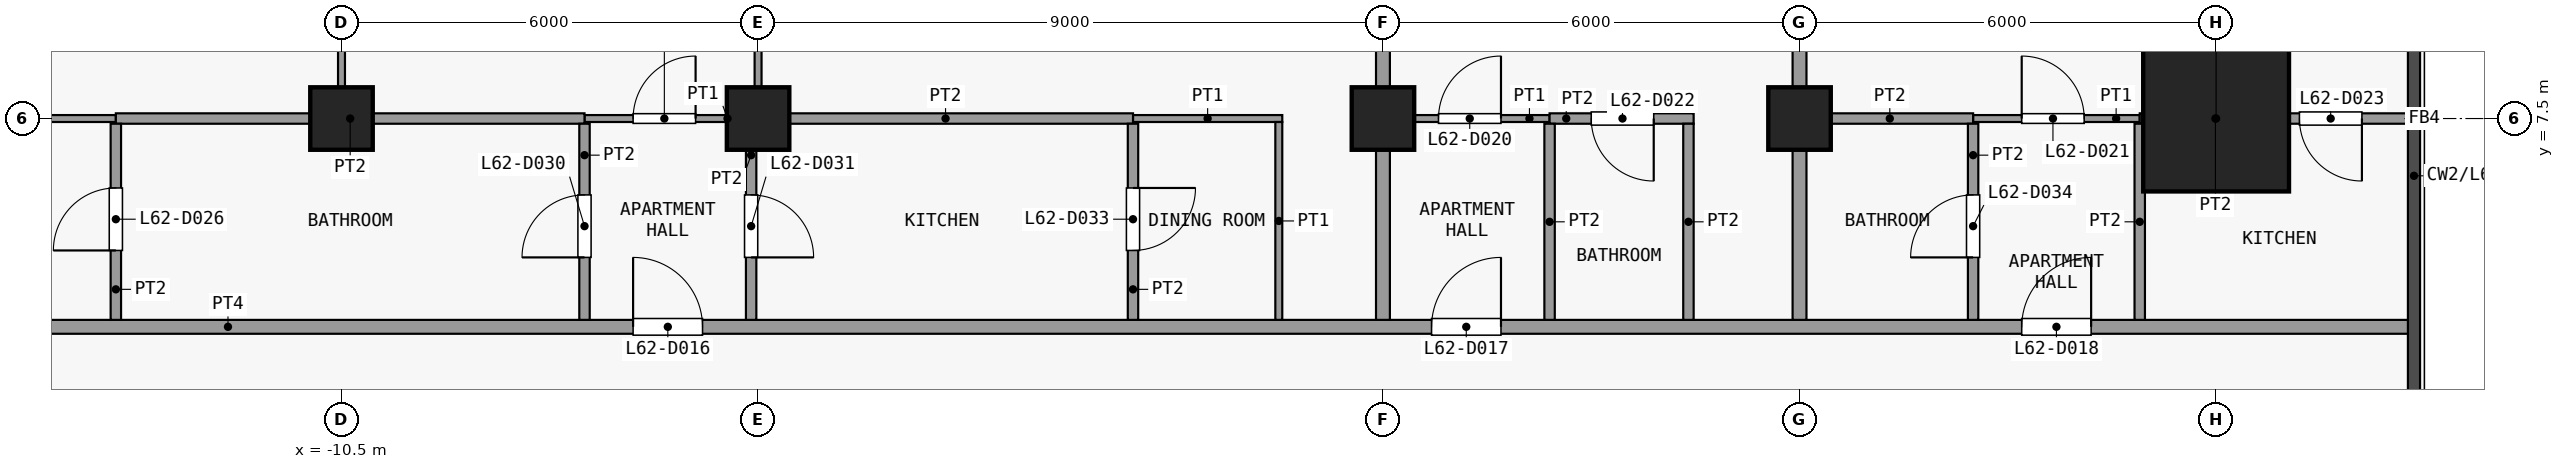
"""IFC4 building model, lengths in metres.
Left out: names, types, materials, properties, quantities, classifications, styles, units other than length and angle.
Written with IfcOpenShell. Run it as: python <this file> out.ifc"""

import sys

from ifc_helpers import new_model, si_unit, direction, frame, frame_2d, origin, origin_2d, place, context, subcontext, project, spatial, rectangle, extrude, element, fill, save


model = new_model("IFC4")
c1 = context("Model", 3, precision=1e-05, world=origin(), true_north=direction((0.0, 1.0)))
c2 = subcontext(c1, "Body", "Model", "MODEL_VIEW")
j1 = project(units=[si_unit("LENGTHUNIT", "METRE"), si_unit("PLANEANGLEUNIT", "RADIAN")], contexts=[c1])
p1 = place(None, origin())
s1 = spatial("IfcSite", under=j1, at=p1, CompositionType="ELEMENT")
p2 = place(p1, origin())
s2 = spatial("IfcBuilding", under=s1, at=p2, CompositionType="ELEMENT")
p3 = place(p2, frame((0.0, 0.0, 244.7)))
s3 = spatial("IfcBuildingStorey", under=s2, at=p3, CompositionType="ELEMENT", Elevation=244.7)
for number, where, z_axis, x_axis in (
    (1, (-10.5, 7.5, 0.0), (0.0, 0.0, 1.0), (1.0, 0.0, 0.0)),
    (2, (-4.5, 7.5, 0.0), (0.0, 0.0, 1.0), (1.0, 0.0, 0.0)),
    (3, (4.5, 7.5, 0.0), (0.0, 0.0, 1.0), (1.0, 0.0, 0.0)),
    (4, (10.5, 7.5, 0.0), (0.0, 0.0, 1.0), (1.0, 0.0, 0.0)),
):
    element("IfcColumn", number, at=place(p3, frame(where, z_axis=z_axis, x_axis=x_axis)), inside=s3, PredefinedType="COLUMN", context=c2, shape_type="SweptSolid", body=[
        extrude(rectangle(XDim=0.9, YDim=0.9, at=origin_2d()), origin(), (0.0, 0.0, 1.0), 3.6),
    ])
p4 = place(p3, frame((16.5, 7.5, 0.0), z_axis=(0.0, 0.0, 1.0), x_axis=(1.0, 0.0, 0.0)))
e5 = element("IfcColumn", 5, at=p4, inside=s3, PredefinedType="COLUMN", context=c2, shape_type="SweptSolid", body=[
    extrude(rectangle(XDim=2.1, YDim=2.1, at=origin_2d()), origin(), (0.0, 0.0, 1.0), 3.6),
])
p5 = place(p3, frame((-17.85, 4.5, 0.0), z_axis=(0.0, 0.0, 1.0), x_axis=(1.0, 0.0, 0.0)))
e6 = element("IfcWall", 6, at=p5, inside=s3, PredefinedType="PARTITIONING", context=c2, shape_type="SweptSolid", body=[
    extrude(rectangle(XDim=37.2, YDim=0.2, at=frame_2d((18.6, 0.0))), origin(), (0.0, 0.0, 1.0), 3.15),
])
p6 = place(p5, frame((11.55, 0.0, 0.0)))
e7 = element("IfcOpeningElement", 7, at=p6, cuts=e6, PredefinedType="OPENING", context=c2, shape_type="SweptSolid", body=[
    extrude(rectangle(XDim=1.0, YDim=2.1, at=frame_2d((0.5, 1.05))), frame((0.0, 0.11, 0.0), z_axis=(0.0, -1.0, 0.0), x_axis=(1.0, 0.0, 0.0)), (0.0, 0.0, 1.0), 0.22),
])
p7 = place(p5, frame((23.05, 0.0, 0.0)))
e8 = element("IfcOpeningElement", 8, at=p7, cuts=e6, PredefinedType="OPENING", context=c2, shape_type="SweptSolid", body=[
    extrude(rectangle(XDim=1.0, YDim=2.1, at=frame_2d((0.5, 1.05))), frame((0.0, 0.11, 0.0), z_axis=(0.0, -1.0, 0.0), x_axis=(1.0, 0.0, 0.0)), (0.0, 0.0, 1.0), 0.22),
])
p8 = place(p5, frame((31.55, 0.0, 0.0)))
e9 = element("IfcOpeningElement", 9, at=p8, cuts=e6, PredefinedType="OPENING", context=c2, shape_type="SweptSolid", body=[
    extrude(rectangle(XDim=1.0, YDim=2.1, at=frame_2d((0.5, 1.05))), frame((0.0, 0.11, 0.0), z_axis=(0.0, -1.0, 0.0), x_axis=(1.0, 0.0, 0.0)), (0.0, 0.0, 1.0), 0.22),
])
p9 = place(p3, frame((-17.85, 7.5, 0.0), z_axis=(0.0, 0.0, 1.0), x_axis=(1.0, 0.0, 0.0)))
e10 = element("IfcWall", 10, at=p9, inside=s3, PredefinedType="PARTITIONING", context=c2, shape_type="SweptSolid", body=[
    extrude(rectangle(XDim=4.1, YDim=0.1, at=frame_2d((2.05, 0.0))), origin(), (0.0, 0.0, 1.0), 3.15),
])
p10 = place(p3, frame((-7.0, 7.5, 0.0), z_axis=(0.0, 0.0, 1.0), x_axis=(1.0, 0.0, 0.0)))
e11 = element("IfcWall", 11, at=p10, inside=s3, PredefinedType="PARTITIONING", context=c2, shape_type="SweptSolid", body=[
    extrude(rectangle(XDim=2.4, YDim=0.1, at=frame_2d((1.2, 0.0))), origin(), (0.0, 0.0, 1.0), 3.15),
])
p11 = place(p10, frame((0.7, 0.0, 0.0)))
e12 = element("IfcOpeningElement", 12, at=p11, cuts=e11, PredefinedType="OPENING", context=c2, shape_type="SweptSolid", body=[
    extrude(rectangle(XDim=0.9, YDim=2.1, at=frame_2d((0.45, 1.05))), frame((0.0, 0.06, 0.0), z_axis=(0.0, -1.0, 0.0), x_axis=(1.0, 0.0, 0.0)), (0.0, 0.0, 1.0), 0.12),
])
p12 = place(p3, frame((0.9, 7.5, 0.0), z_axis=(0.0, 0.0, 1.0), x_axis=(1.0, 0.0, 0.0)))
e13 = element("IfcWall", 13, at=p12, inside=s3, PredefinedType="PARTITIONING", context=c2, shape_type="SweptSolid", body=[
    extrude(rectangle(XDim=2.15, YDim=0.1, at=frame_2d((1.075, 0.0))), origin(), (0.0, 0.0, 1.0), 3.15),
])
p13 = place(p3, frame((4.6, 7.5, 0.0), z_axis=(0.0, 0.0, 1.0), x_axis=(1.0, 0.0, 0.0)))
e14 = element("IfcWall", 14, at=p13, inside=s3, PredefinedType="PARTITIONING", context=c2, shape_type="SweptSolid", body=[
    extrude(rectangle(XDim=2.3, YDim=0.1, at=frame_2d((1.15, 0.0))), origin(), (0.0, 0.0, 1.0), 3.15),
])
p14 = place(p13, frame((0.7, 0.0, 0.0)))
e15 = element("IfcOpeningElement", 15, at=p14, cuts=e14, PredefinedType="OPENING", context=c2, shape_type="SweptSolid", body=[
    extrude(rectangle(XDim=0.9, YDim=2.1, at=frame_2d((0.45, 1.05))), frame((0.0, 0.06, 0.0), z_axis=(0.0, -1.0, 0.0), x_axis=(1.0, 0.0, 0.0)), (0.0, 0.0, 1.0), 0.12),
])
p15 = place(p3, frame((13.0, 7.5, 0.0), z_axis=(0.0, 0.0, 1.0), x_axis=(1.0, 0.0, 0.0)))
e16 = element("IfcWall", 16, at=p15, inside=s3, PredefinedType="PARTITIONING", context=c2, shape_type="SweptSolid", body=[
    extrude(rectangle(XDim=2.4, YDim=0.1, at=frame_2d((1.2, 0.0))), origin(), (0.0, 0.0, 1.0), 3.15),
])
p16 = place(p15, frame((0.7, 0.0, 0.0)))
e17 = element("IfcOpeningElement", 17, at=p16, cuts=e16, PredefinedType="OPENING", context=c2, shape_type="SweptSolid", body=[
    extrude(rectangle(XDim=0.9, YDim=2.1, at=frame_2d((0.45, 1.05))), frame((0.0, 0.06, 0.0), z_axis=(0.0, -1.0, 0.0), x_axis=(1.0, 0.0, 0.0)), (0.0, 0.0, 1.0), 0.12),
])
p17 = place(p3, frame((-13.75, 7.5, 0.0), z_axis=(0.0, 0.0, 1.0), x_axis=(1.0, 0.0, 0.0)))
e18 = element("IfcWall", 18, at=p17, inside=s3, PredefinedType="PARTITIONING", context=c2, shape_type="SweptSolid", body=[
    extrude(rectangle(XDim=6.75, YDim=0.15, at=frame_2d((3.375, 0.0))), origin(), (0.0, 0.0, 1.0), 3.15),
])
p18 = place(p3, frame((-4.5, 7.5, 0.0), z_axis=(0.0, 0.0, 1.0), x_axis=(1.0, 0.0, 0.0)))
e19 = element("IfcWall", 19, at=p18, inside=s3, PredefinedType="PARTITIONING", context=c2, shape_type="SweptSolid", body=[
    extrude(rectangle(XDim=5.4, YDim=0.15, at=frame_2d((2.7, 0.0))), origin(), (0.0, 0.0, 1.0), 3.15),
])
p19 = place(p3, frame((6.9, 7.5, 0.0), z_axis=(0.0, 0.0, 1.0), x_axis=(1.0, 0.0, 0.0)))
e20 = element("IfcWall", 20, at=p19, inside=s3, PredefinedType="PARTITIONING", context=c2, shape_type="SweptSolid", body=[
    extrude(rectangle(XDim=2.075, YDim=0.15, at=frame_2d((1.038, 0.0))), origin(), (0.0, 0.0, 1.0), 3.15),
])
p20 = place(p19, frame((0.6, 0.0, 0.0)))
e21 = element("IfcOpeningElement", 21, at=p20, cuts=e20, PredefinedType="OPENING", context=c2, shape_type="SweptSolid", body=[
    extrude(rectangle(XDim=0.9, YDim=2.1, at=frame_2d((0.45, 1.05))), frame((0.0, 0.085, 0.0), z_axis=(0.0, -1.0, 0.0), x_axis=(1.0, 0.0, 0.0)), (0.0, 0.0, 1.0), 0.17),
])
p21 = place(p3, frame((10.6, 7.5, 0.0), z_axis=(0.0, 0.0, 1.0), x_axis=(1.0, 0.0, 0.0)))
e22 = element("IfcWall", 22, at=p21, inside=s3, PredefinedType="PARTITIONING", context=c2, shape_type="SweptSolid", body=[
    extrude(rectangle(XDim=2.4, YDim=0.15, at=frame_2d((1.2, 0.0))), origin(), (0.0, 0.0, 1.0), 3.15),
])
p22 = place(p3, frame((15.4, 7.5, 0.0), z_axis=(0.0, 0.0, 1.0), x_axis=(1.0, 0.0, 0.0)))
e23 = element("IfcWall", 23, at=p22, inside=s3, PredefinedType="PARTITIONING", context=c2, shape_type="SweptSolid", body=[
    extrude(rectangle(XDim=3.863, YDim=0.15, at=frame_2d((1.931, 0.0))), origin(), (0.0, 0.0, 1.0), 3.15),
])
p23 = place(p22, frame((2.3, 0.0, 0.0)))
e24 = element("IfcOpeningElement", 24, at=p23, cuts=e23, PredefinedType="OPENING", context=c2, shape_type="SweptSolid", body=[
    extrude(rectangle(XDim=0.9, YDim=2.1, at=frame_2d((0.45, 1.05))), frame((0.0, 0.085, 0.0), z_axis=(0.0, -1.0, 0.0), x_axis=(1.0, 0.0, 0.0)), (0.0, 0.0, 1.0), 0.17),
])
p24 = place(p3, frame((-13.75, 4.6, 0.0), z_axis=(0.0, 0.0, 1.0), x_axis=(0.0, 1.0, 0.0)))
e25 = element("IfcWall", 25, at=p24, inside=s3, PredefinedType="PARTITIONING", context=c2, shape_type="SweptSolid", body=[
    extrude(rectangle(XDim=2.825, YDim=0.15, at=frame_2d((1.413, 0.0))), origin(), (0.0, 0.0, 1.0), 3.15),
])
p25 = place(p24, frame((1.0, 0.0, 0.0)))
e26 = element("IfcOpeningElement", 26, at=p25, cuts=e25, PredefinedType="OPENING", context=c2, shape_type="SweptSolid", body=[
    extrude(rectangle(XDim=0.9, YDim=2.1, at=frame_2d((0.45, 1.05))), frame((0.0, 0.085, 0.0), z_axis=(0.0, -1.0, 0.0), x_axis=(1.0, 0.0, 0.0)), (0.0, 0.0, 1.0), 0.17),
])
p26 = place(p3, frame((-10.5, 7.575, 0.0), z_axis=(0.0, 0.0, 1.0), x_axis=(0.0, 1.0, 0.0)))
e27 = element("IfcWall", 27, at=p26, inside=s3, PredefinedType="PARTITIONING", context=c2, shape_type="SweptSolid", body=[
    extrude(rectangle(XDim=8.688, YDim=0.1, at=frame_2d((4.344, 0.0))), origin(), (0.0, 0.0, 1.0), 3.15),
])
p27 = place(p26, frame((6.425, 0.0, 0.0)))
e28 = element("IfcOpeningElement", 28, at=p27, cuts=e27, PredefinedType="OPENING", context=c2, shape_type="SweptSolid", body=[
    extrude(rectangle(XDim=0.9, YDim=2.1, at=frame_2d((0.45, 1.05))), frame((0.0, 0.06, 0.0), z_axis=(0.0, -1.0, 0.0), x_axis=(1.0, 0.0, 0.0)), (0.0, 0.0, 1.0), 0.12),
])
p28 = place(p3, frame((-7.0, 4.6, 0.0), z_axis=(0.0, 0.0, 1.0), x_axis=(0.0, 1.0, 0.0)))
e29 = element("IfcWall", 29, at=p28, inside=s3, PredefinedType="PARTITIONING", context=c2, shape_type="SweptSolid", body=[
    extrude(rectangle(XDim=2.825, YDim=0.15, at=frame_2d((1.413, 0.0))), origin(), (0.0, 0.0, 1.0), 3.15),
])
p29 = place(p28, frame((0.9, 0.0, 0.0)))
e30 = element("IfcOpeningElement", 30, at=p29, cuts=e29, PredefinedType="OPENING", context=c2, shape_type="SweptSolid", body=[
    extrude(rectangle(XDim=0.9, YDim=2.1, at=frame_2d((0.45, 1.05))), frame((0.0, 0.085, 0.0), z_axis=(0.0, -1.0, 0.0), x_axis=(1.0, 0.0, 0.0)), (0.0, 0.0, 1.0), 0.17),
])
p30 = place(p3, frame((-4.6, 4.6, 0.0), z_axis=(0.0, 0.0, 1.0), x_axis=(0.0, 1.0, 0.0)))
e31 = element("IfcWall", 31, at=p30, inside=s3, PredefinedType="PARTITIONING", context=c2, shape_type="SweptSolid", body=[
    extrude(rectangle(XDim=2.825, YDim=0.15, at=frame_2d((1.413, 0.0))), origin(), (0.0, 0.0, 1.0), 3.15),
])
p31 = place(p30, frame((0.9, 0.0, 0.0)))
e32 = element("IfcOpeningElement", 32, at=p31, cuts=e31, PredefinedType="OPENING", context=c2, shape_type="SweptSolid", body=[
    extrude(rectangle(XDim=0.9, YDim=2.1, at=frame_2d((0.45, 1.05))), frame((0.0, 0.085, 0.0), z_axis=(0.0, -1.0, 0.0), x_axis=(1.0, 0.0, 0.0)), (0.0, 0.0, 1.0), 0.17),
])
p32 = place(p3, frame((-4.5, 7.575, 0.0), z_axis=(0.0, 0.0, 1.0), x_axis=(0.0, 1.0, 0.0)))
e33 = element("IfcWall", 33, at=p32, inside=s3, PredefinedType="PARTITIONING", context=c2, shape_type="SweptSolid", body=[
    extrude(rectangle(XDim=8.688, YDim=0.1, at=frame_2d((4.344, 0.0))), origin(), (0.0, 0.0, 1.0), 3.15),
])
p33 = place(p32, frame((6.425, 0.0, 0.0)))
e34 = element("IfcOpeningElement", 34, at=p33, cuts=e33, PredefinedType="OPENING", context=c2, shape_type="SweptSolid", body=[
    extrude(rectangle(XDim=0.9, YDim=2.1, at=frame_2d((0.45, 1.05))), frame((0.0, 0.06, 0.0), z_axis=(0.0, -1.0, 0.0), x_axis=(1.0, 0.0, 0.0)), (0.0, 0.0, 1.0), 0.12),
])
p34 = place(p3, frame((0.9, 4.6, 0.0), z_axis=(0.0, 0.0, 1.0), x_axis=(0.0, 1.0, 0.0)))
e35 = element("IfcWall", 35, at=p34, inside=s3, PredefinedType="PARTITIONING", context=c2, shape_type="SweptSolid", body=[
    extrude(rectangle(XDim=2.825, YDim=0.15, at=frame_2d((1.413, 0.0))), origin(), (0.0, 0.0, 1.0), 3.15),
])
p35 = place(p34, frame((1.0, 0.0, 0.0)))
e36 = element("IfcOpeningElement", 36, at=p35, cuts=e35, PredefinedType="OPENING", context=c2, shape_type="SweptSolid", body=[
    extrude(rectangle(XDim=0.9, YDim=2.1, at=frame_2d((0.45, 1.05))), frame((0.0, 0.085, 0.0), z_axis=(0.0, -1.0, 0.0), x_axis=(1.0, 0.0, 0.0)), (0.0, 0.0, 1.0), 0.17),
])
p36 = place(p3, frame((3.0, 4.6, 0.0), z_axis=(0.0, 0.0, 1.0), x_axis=(0.0, 1.0, 0.0)))
e37 = element("IfcWall", 37, at=p36, inside=s3, PredefinedType="PARTITIONING", context=c2, shape_type="SweptSolid", body=[
    extrude(rectangle(XDim=2.85, YDim=0.1, at=frame_2d((1.425, 0.0))), origin(), (0.0, 0.0, 1.0), 3.15),
])
p37 = place(p3, frame((4.5, 4.6, 0.0), z_axis=(0.0, 0.0, 1.0), x_axis=(0.0, 1.0, 0.0)))
e38 = element("IfcWall", 38, at=p37, inside=s3, PredefinedType="PARTITIONING", context=c2, shape_type="SweptSolid", body=[
    extrude(rectangle(XDim=11.662, YDim=0.2, at=frame_2d((5.831, 0.0))), origin(), (0.0, 0.0, 1.0), 3.15),
])
for number, where, z_axis, x_axis in (
    (39, (6.9, 4.6, 0.0), (0.0, 0.0, 1.0), (0.0, 1.0, 0.0)),
    (40, (8.9, 4.6, 0.0), (0.0, 0.0, 1.0), (0.0, 1.0, 0.0)),
):
    element("IfcWall", number, at=place(p3, frame(where, z_axis=z_axis, x_axis=x_axis)), inside=s3, PredefinedType="PARTITIONING", context=c2, shape_type="SweptSolid", body=[
        extrude(rectangle(XDim=2.825, YDim=0.15, at=frame_2d((1.413, 0.0))), origin(), (0.0, 0.0, 1.0), 3.15),
    ])
p38 = place(p3, frame((10.5, 4.6, 0.0), z_axis=(0.0, 0.0, 1.0), x_axis=(0.0, 1.0, 0.0)))
e41 = element("IfcWall", 41, at=p38, inside=s3, PredefinedType="PARTITIONING", context=c2, shape_type="SweptSolid", body=[
    extrude(rectangle(XDim=11.662, YDim=0.2, at=frame_2d((5.831, 0.0))), origin(), (0.0, 0.0, 1.0), 3.15),
])
p39 = place(p3, frame((13.0, 4.6, 0.0), z_axis=(0.0, 0.0, 1.0), x_axis=(0.0, 1.0, 0.0)))
e42 = element("IfcWall", 42, at=p39, inside=s3, PredefinedType="PARTITIONING", context=c2, shape_type="SweptSolid", body=[
    extrude(rectangle(XDim=2.825, YDim=0.15, at=frame_2d((1.413, 0.0))), origin(), (0.0, 0.0, 1.0), 3.15),
])
p40 = place(p39, frame((0.9, 0.0, 0.0)))
e43 = element("IfcOpeningElement", 43, at=p40, cuts=e42, PredefinedType="OPENING", context=c2, shape_type="SweptSolid", body=[
    extrude(rectangle(XDim=0.9, YDim=2.1, at=frame_2d((0.45, 1.05))), frame((0.0, 0.085, 0.0), z_axis=(0.0, -1.0, 0.0), x_axis=(1.0, 0.0, 0.0)), (0.0, 0.0, 1.0), 0.17),
])
p41 = place(p3, frame((15.4, 4.6, 0.0), z_axis=(0.0, 0.0, 1.0), x_axis=(0.0, 1.0, 0.0)))
e44 = element("IfcWall", 44, at=p41, inside=s3, PredefinedType="PARTITIONING", context=c2, shape_type="SweptSolid", body=[
    extrude(rectangle(XDim=2.825, YDim=0.15, at=frame_2d((1.413, 0.0))), origin(), (0.0, 0.0, 1.0), 3.15),
])
p42 = place(p6, origin())
e45 = element("IfcDoor", 45, at=p42, inside=s3, OperationType="SINGLE_SWING_RIGHT", PredefinedType="DOOR", context=c2, shape_type="SweptSolid", body=[
    extrude(rectangle(XDim=1.0, YDim=2.1, at=frame_2d((0.5, 1.05))), frame((0.0, 0.025, 0.0), z_axis=(0.0, -1.0, 0.0), x_axis=(1.0, 0.0, 0.0)), (0.0, 0.0, 1.0), 0.05),
])
fill(e7, e45)
p43 = place(p7, origin())
e46 = element("IfcDoor", 46, at=p43, inside=s3, OperationType="SINGLE_SWING_LEFT", PredefinedType="DOOR", context=c2, shape_type="SweptSolid", body=[
    extrude(rectangle(XDim=1.0, YDim=2.1, at=frame_2d((0.5, 1.05))), frame((0.0, 0.025, 0.0), z_axis=(0.0, -1.0, 0.0), x_axis=(1.0, 0.0, 0.0)), (0.0, 0.0, 1.0), 0.05),
])
fill(e8, e46)
p44 = place(p8, origin())
e47 = element("IfcDoor", 47, at=p44, inside=s3, OperationType="SINGLE_SWING_LEFT", PredefinedType="DOOR", context=c2, shape_type="SweptSolid", body=[
    extrude(rectangle(XDim=1.0, YDim=2.1, at=frame_2d((0.5, 1.05))), frame((0.0, 0.025, 0.0), z_axis=(0.0, -1.0, 0.0), x_axis=(1.0, 0.0, 0.0)), (0.0, 0.0, 1.0), 0.05),
])
fill(e9, e47)
p45 = place(p11, origin())
e48 = element("IfcDoor", 48, at=p45, inside=s3, OperationType="SINGLE_SWING_LEFT", PredefinedType="DOOR", context=c2, shape_type="SweptSolid", body=[
    extrude(rectangle(XDim=0.9, YDim=2.1, at=frame_2d((0.45, 1.05))), frame((0.0, 0.025, 0.0), z_axis=(0.0, -1.0, 0.0), x_axis=(1.0, 0.0, 0.0)), (0.0, 0.0, 1.0), 0.05),
])
fill(e12, e48)
p46 = place(p14, origin())
e49 = element("IfcDoor", 49, at=p46, inside=s3, OperationType="SINGLE_SWING_LEFT", PredefinedType="DOOR", context=c2, shape_type="SweptSolid", body=[
    extrude(rectangle(XDim=0.9, YDim=2.1, at=frame_2d((0.45, 1.05))), frame((0.0, 0.025, 0.0), z_axis=(0.0, -1.0, 0.0), x_axis=(1.0, 0.0, 0.0)), (0.0, 0.0, 1.0), 0.05),
])
fill(e15, e49)
p47 = place(p16, origin())
e50 = element("IfcDoor", 50, at=p47, inside=s3, OperationType="SINGLE_SWING_RIGHT", PredefinedType="DOOR", context=c2, shape_type="SweptSolid", body=[
    extrude(rectangle(XDim=0.9, YDim=2.1, at=frame_2d((0.45, 1.05))), frame((0.0, 0.025, 0.0), z_axis=(0.0, -1.0, 0.0), x_axis=(1.0, 0.0, 0.0)), (0.0, 0.0, 1.0), 0.05),
])
fill(e17, e50)
p48 = place(p20, origin())
e51 = element("IfcDoor", 51, at=p48, inside=s3, OperationType="SINGLE_SWING_RIGHT", PredefinedType="DOOR", context=c2, shape_type="SweptSolid", body=[
    extrude(rectangle(XDim=0.9, YDim=2.1, at=frame_2d((0.45, 1.05))), frame((0.0, 0.025, 0.0), z_axis=(0.0, -1.0, 0.0), x_axis=(1.0, 0.0, 0.0)), (0.0, 0.0, 1.0), 0.05),
])
fill(e21, e51)
p49 = place(p23, origin())
e52 = element("IfcDoor", 52, at=p49, inside=s3, OperationType="SINGLE_SWING_RIGHT", PredefinedType="DOOR", context=c2, shape_type="SweptSolid", body=[
    extrude(rectangle(XDim=0.9, YDim=2.1, at=frame_2d((0.45, 1.05))), frame((0.0, 0.025, 0.0), z_axis=(0.0, -1.0, 0.0), x_axis=(1.0, 0.0, 0.0)), (0.0, 0.0, 1.0), 0.05),
])
fill(e24, e52)
p50 = place(p25, origin())
e53 = element("IfcDoor", 53, at=p50, inside=s3, OperationType="SINGLE_SWING_RIGHT", PredefinedType="DOOR", context=c2, shape_type="SweptSolid", body=[
    extrude(rectangle(XDim=0.9, YDim=2.1, at=frame_2d((0.45, 1.05))), frame((0.0, 0.025, 0.0), z_axis=(0.0, -1.0, 0.0), x_axis=(1.0, 0.0, 0.0)), (0.0, 0.0, 1.0), 0.05),
])
fill(e26, e53)
p51 = place(p29, origin())
e54 = element("IfcDoor", 54, at=p51, inside=s3, OperationType="SINGLE_SWING_RIGHT", PredefinedType="DOOR", context=c2, shape_type="SweptSolid", body=[
    extrude(rectangle(XDim=0.9, YDim=2.1, at=frame_2d((0.45, 1.05))), frame((0.0, 0.025, 0.0), z_axis=(0.0, -1.0, 0.0), x_axis=(1.0, 0.0, 0.0)), (0.0, 0.0, 1.0), 0.05),
])
fill(e30, e54)
p52 = place(p31, origin())
e55 = element("IfcDoor", 55, at=p52, inside=s3, OperationType="SINGLE_SWING_LEFT", PredefinedType="DOOR", context=c2, shape_type="SweptSolid", body=[
    extrude(rectangle(XDim=0.9, YDim=2.1, at=frame_2d((0.45, 1.05))), frame((0.0, 0.025, 0.0), z_axis=(0.0, -1.0, 0.0), x_axis=(1.0, 0.0, 0.0)), (0.0, 0.0, 1.0), 0.05),
])
fill(e32, e55)
p53 = place(p35, origin())
e56 = element("IfcDoor", 56, at=p53, inside=s3, OperationType="SINGLE_SWING_RIGHT", PredefinedType="DOOR", context=c2, shape_type="SweptSolid", body=[
    extrude(rectangle(XDim=0.9, YDim=2.1, at=frame_2d((0.45, 1.05))), frame((0.0, 0.025, 0.0), z_axis=(0.0, -1.0, 0.0), x_axis=(1.0, 0.0, 0.0)), (0.0, 0.0, 1.0), 0.05),
])
fill(e36, e56)
p54 = place(p40, origin())
e57 = element("IfcDoor", 57, at=p54, inside=s3, OperationType="SINGLE_SWING_RIGHT", PredefinedType="DOOR", context=c2, shape_type="SweptSolid", body=[
    extrude(rectangle(XDim=0.9, YDim=2.1, at=frame_2d((0.45, 1.05))), frame((0.0, 0.025, 0.0), z_axis=(0.0, -1.0, 0.0), x_axis=(1.0, 0.0, 0.0)), (0.0, 0.0, 1.0), 0.05),
])
fill(e43, e57)
save(model, sys.argv[1])
